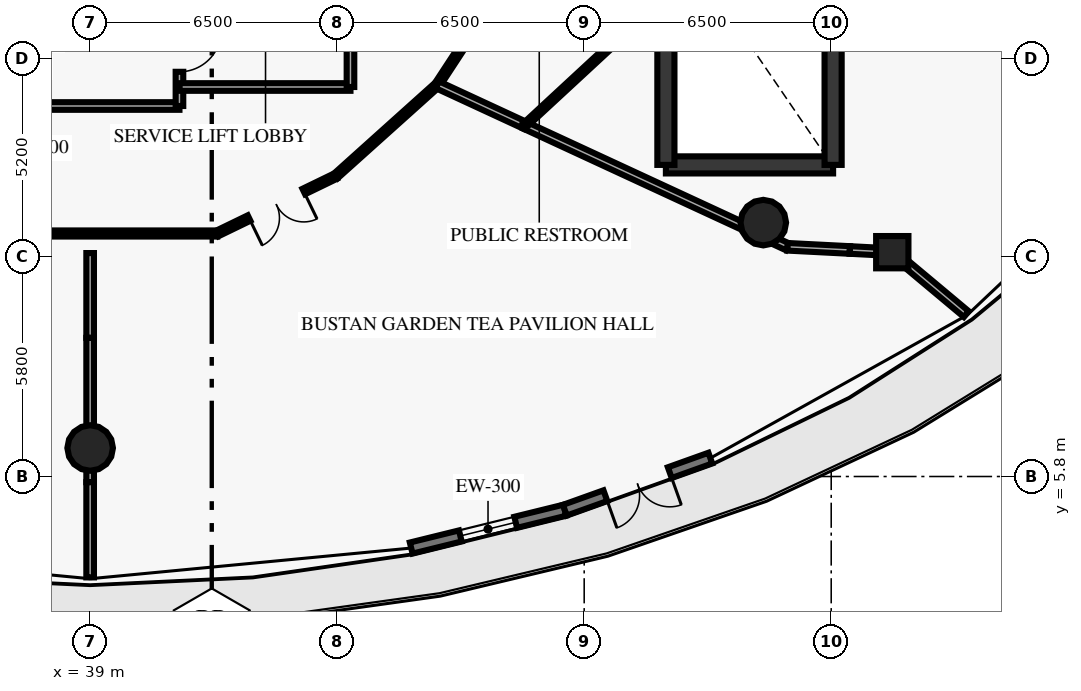
"""IFC4 building model, lengths in metres.
Left out: names, types, materials, properties, quantities, classifications, styles, units other than length and angle.
Written with IfcOpenShell. Run it as: python <this file> out.ifc"""

import sys

from ifc_helpers import new_model, si_unit, direction, frame, frame_2d, origin, origin_2d, place, context, subcontext, project, spatial, rectangle, circle, extrude, element, fill, save


model = new_model("IFC4")
c1 = context("Model", 3, precision=1e-05, world=origin(), true_north=direction((0.0, 1.0)))
c2 = subcontext(c1, "Body", "Model", "MODEL_VIEW")
j1 = project(units=[si_unit("LENGTHUNIT", "METRE"), si_unit("PLANEANGLEUNIT", "RADIAN")], contexts=[c1])
p1 = place(None, origin())
s1 = spatial("IfcSite", under=j1, at=p1, CompositionType="ELEMENT")
p2 = place(p1, origin())
s2 = spatial("IfcBuilding", under=s1, at=p2, CompositionType="ELEMENT")
p3 = place(p2, frame((0.0, 0.0, 16.0)))
s3 = spatial("IfcBuildingStorey", under=s2, at=p3, CompositionType="ELEMENT", Elevation=16.0)
for number, where, z_axis, x_axis in (
    (1, (39.0, 6.55, 0.0), (0.0, 0.0, 1.0), (1.0, 0.0, 0.0)),
    (2, (56.713, 12.481, 0.0), (0.0, 0.0, 1.0), (1.0, 0.0, 0.0)),
):
    element("IfcColumn", number, at=place(p3, frame(where, z_axis=z_axis, x_axis=x_axis)), inside=s3, PredefinedType="COLUMN", context=c2, shape_type="SweptSolid", body=[
        extrude(circle(Radius=0.6, at=origin_2d()), origin(), (0.0, 0.0, 1.0), 4.74),
    ])
p4 = place(p3, frame((60.107, 11.703, 0.0), z_axis=(0.0, 0.0, 1.0), x_axis=(1.0, 0.0, 0.0)))
e3 = element("IfcColumn", 3, at=p4, inside=s3, PredefinedType="COLUMN", context=c2, shape_type="SweptSolid", body=[
    extrude(rectangle(XDim=0.85, YDim=0.85, at=origin_2d()), origin(), (0.0, 0.0, 1.0), 4.74),
])
p5 = place(p3, frame((51.491, 4.913, 0.0), z_axis=(0.0, 0.0, 1.0), x_axis=(-0.970964611728, -0.239223165208, 0.0)))
e4 = element("IfcWall", 4, at=p5, inside=s3, PredefinedType="STANDARD", context=c2, shape_type="SweptSolid", body=[
    extrude(rectangle(XDim=4.164, YDim=0.3, at=frame_2d((2.082, 0.0))), origin(), (0.0, 0.0, 1.0), 4.74),
])
p6 = place(p5, frame((1.332, 0.0, 0.9)))
e5 = element("IfcOpeningElement", 5, at=p6, cuts=e4, PredefinedType="OPENING", context=c2, shape_type="SweptSolid", body=[
    extrude(rectangle(XDim=1.5, YDim=2.2, at=frame_2d((0.75, 1.1))), frame((0.0, 0.16, 0.0), z_axis=(0.0, -1.0, 0.0), x_axis=(1.0, 0.0, 0.0)), (0.0, 0.0, 1.0), 0.32),
])
p7 = place(p3, frame((55.32, 6.284, 0.0), z_axis=(0.0, 0.0, 1.0), x_axis=(-0.941483594304, -0.337058810381, 0.0)))
e6 = element("IfcWall", 6, at=p7, inside=s3, PredefinedType="STANDARD", context=c2, shape_type="SweptSolid", body=[
    extrude(rectangle(XDim=4.067, YDim=0.3, at=frame_2d((2.034, 0.0))), origin(), (0.0, 0.0, 1.0), 4.74),
])
p8 = place(p7, frame((1.134, 0.0, 0.0)))
e7 = element("IfcOpeningElement", 7, at=p8, cuts=e6, PredefinedType="OPENING", context=c2, shape_type="SweptSolid", body=[
    extrude(rectangle(XDim=1.8, YDim=2.25, at=frame_2d((0.9, 1.125))), frame((0.0, 0.16, 0.0), z_axis=(0.0, -1.0, 0.0), x_axis=(1.0, 0.0, 0.0)), (0.0, 0.0, 1.0), 0.32),
])
p9 = place(p3, frame((54.15, 14.0, 0.0), z_axis=(0.0, 0.0, 1.0), x_axis=(1.0, 0.0, 0.0)))
e8 = element("IfcWall", 8, at=p9, inside=s3, PredefinedType="SHEAR", context=c2, shape_type="SweptSolid", body=[
    extrude(rectangle(XDim=4.4, YDim=0.45, at=frame_2d((2.2, 0.0))), origin(), (0.0, 0.0, 1.0), 4.74),
])
for number, where, z_axis, x_axis in (
    (9, (54.15, 14.0, 0.0), (0.0, 0.0, 1.0), (0.0, 1.0, 0.0)),
    (10, (58.55, 14.0, 0.0), (0.0, 0.0, 1.0), (0.0, 1.0, 0.0)),
):
    element("IfcWall", number, at=place(p3, frame(where, z_axis=z_axis, x_axis=x_axis)), inside=s3, PredefinedType="SHEAR", context=c2, shape_type="SweptSolid", body=[
        extrude(rectangle(XDim=7.9, YDim=0.45, at=frame_2d((3.95, 0.0))), origin(), (0.0, 0.0, 1.0), 4.74),
    ])
p10 = place(p3, frame((33.8, 15.55, 0.0), z_axis=(0.0, 0.0, 1.0), x_axis=(1.0, 0.0, 0.0)))
e11 = element("IfcWall", 11, at=p10, inside=s3, PredefinedType="SOLIDWALL", context=c2, shape_type="SweptSolid", body=[
    extrude(rectangle(XDim=7.55, YDim=0.2, at=frame_2d((3.775, 0.0))), origin(), (0.0, 0.0, 1.0), 4.74),
])
p11 = place(p3, frame((41.35, 15.55, 0.0), z_axis=(0.0, 0.0, 1.0), x_axis=(0.0, 1.0, 0.0)))
e12 = element("IfcWall", 12, at=p11, inside=s3, PredefinedType="SOLIDWALL", context=c2, shape_type="SweptSolid", body=[
    extrude(rectangle(XDim=2.8, YDim=0.2, at=frame_2d((1.4, 0.0))), origin(), (0.0, 0.0, 1.0), 4.74),
])
p12 = place(p11, frame((0.9, 0.0, 0.0)))
e13 = element("IfcOpeningElement", 13, at=p12, cuts=e12, PredefinedType="OPENING", context=c2, shape_type="SweptSolid", body=[
    extrude(rectangle(XDim=1.1, YDim=2.15, at=frame_2d((0.55, 1.075))), frame((0.0, 0.11, 0.0), z_axis=(0.0, -1.0, 0.0), x_axis=(1.0, 0.0, 0.0)), (0.0, 0.0, 1.0), 0.22),
])
p13 = place(p3, frame((41.35, 16.05, 0.0), z_axis=(0.0, 0.0, 1.0), x_axis=(1.0, 0.0, 0.0)))
e14 = element("IfcWall", 14, at=p13, inside=s3, PredefinedType="SOLIDWALL", context=c2, shape_type="SweptSolid", body=[
    extrude(rectangle(XDim=4.5, YDim=0.2, at=frame_2d((2.25, 0.0))), origin(), (0.0, 0.0, 1.0), 4.74),
])
p14 = place(p3, frame((45.85, 16.05, 0.0), z_axis=(0.0, 0.0, 1.0), x_axis=(0.0, 1.0, 0.0)))
e15 = element("IfcWall", 15, at=p14, inside=s3, PredefinedType="SOLIDWALL", context=c2, shape_type="SweptSolid", body=[
    extrude(rectangle(XDim=2.3, YDim=0.2, at=frame_2d((1.15, 0.0))), origin(), (0.0, 0.0, 1.0), 4.74),
])
p15 = place(p3, frame((35.656, 12.195, 0.0), z_axis=(0.0, 0.0, 1.0), x_axis=(1.0, 0.0, 0.0)))
e16 = element("IfcWall", 16, at=p15, inside=s3, PredefinedType="PARTITIONING", context=c2, shape_type="SweptSolid", body=[
    extrude(rectangle(XDim=6.688, YDim=0.16, at=frame_2d((3.344, 0.0))), origin(), (0.0, 0.0, 1.0), 4.74),
])
p16 = place(p3, frame((45.46, 13.706, 0.0), z_axis=(0.0, 0.0, 1.0), x_axis=(-0.899789784655, -0.436323668199, 0.0)))
e17 = element("IfcWall", 17, at=p16, inside=s3, PredefinedType="PARTITIONING", context=c2, shape_type="SweptSolid", body=[
    extrude(rectangle(XDim=3.463, YDim=0.16, at=frame_2d((1.731, 0.0))), origin(), (0.0, 0.0, 1.0), 4.74),
])
p17 = place(p16, frame((0.932, 0.0, 0.0)))
e18 = element("IfcOpeningElement", 18, at=p17, cuts=e17, PredefinedType="OPENING", context=c2, shape_type="SweptSolid", body=[
    extrude(rectangle(XDim=1.6, YDim=2.2, at=frame_2d((0.8, 1.1))), frame((0.0, 0.09, 0.0), z_axis=(0.0, -1.0, 0.0), x_axis=(1.0, 0.0, 0.0)), (0.0, 0.0, 1.0), 0.18),
])
p18 = place(p3, frame((45.46, 13.706, 0.0), z_axis=(0.0, 0.0, 1.0), x_axis=(0.744066617248, 0.668105432621, 0.0)))
e19 = element("IfcWall", 19, at=p18, inside=s3, PredefinedType="PARTITIONING", context=c2, shape_type="SweptSolid", body=[
    extrude(rectangle(XDim=3.596, YDim=0.16, at=frame_2d((1.798, 0.0))), origin(), (0.0, 0.0, 1.0), 4.74),
])
p19 = place(p3, frame((50.189, 19.24, 0.0), z_axis=(0.0, 0.0, 1.0), x_axis=(-0.548318837904, -0.836269365694, 0.0)))
e20 = element("IfcWall", 20, at=p19, inside=s3, PredefinedType="PARTITIONING", context=c2, shape_type="SweptSolid", body=[
    extrude(rectangle(XDim=3.744, YDim=0.16, at=frame_2d((1.872, 0.0))), origin(), (0.0, 0.0, 1.0), 4.74),
])
p20 = place(p19, frame((1.447, 0.0, 0.0)))
e21 = element("IfcOpeningElement", 21, at=p20, cuts=e20, PredefinedType="OPENING", context=c2, shape_type="SweptSolid", body=[
    extrude(rectangle(XDim=0.85, YDim=2.1, at=frame_2d((0.425, 1.05))), frame((0.0, 0.09, 0.0), z_axis=(0.0, -1.0, 0.0), x_axis=(1.0, 0.0, 0.0)), (0.0, 0.0, 1.0), 0.18),
])
p21 = place(p3, frame((39.0, 11.68, 0.0), z_axis=(0.0, 0.0, 1.0), x_axis=(0.0, -1.0, 0.0)))
e22 = element("IfcWall", 22, at=p21, inside=s3, PredefinedType="PARTITIONING", context=c2, shape_type="SweptSolid", body=[
    extrude(rectangle(XDim=2.231, YDim=0.2, at=frame_2d((1.115, 0.0))), origin(), (0.0, 0.0, 1.0), 4.74),
])
p22 = place(p3, frame((39.0, 9.449, 0.0), z_axis=(0.0, 0.0, 1.0), x_axis=(0.0, -1.0, 0.0)))
e23 = element("IfcWall", 23, at=p22, inside=s3, PredefinedType="PARTITIONING", context=c2, shape_type="SweptSolid", body=[
    extrude(rectangle(XDim=2.913, YDim=0.2, at=frame_2d((1.457, 0.0))), origin(), (0.0, 0.0, 1.0), 2.74),
])
p23 = place(p3, frame((39.0, 6.536, 0.0), z_axis=(0.0, 0.0, 1.0), x_axis=(0.0, -1.0, 0.0)))
e24 = element("IfcWall", 24, at=p23, inside=s3, PredefinedType="PARTITIONING", context=c2, shape_type="SweptSolid", body=[
    extrude(rectangle(XDim=0.886, YDim=0.2, at=frame_2d((0.443, 0.0))), origin(), (0.0, 0.0, 1.0), 4.74),
])
p24 = place(p3, frame((39.0, 5.65, 0.0), z_axis=(0.0, 0.0, 1.0), x_axis=(0.0, -1.0, 0.0)))
e25 = element("IfcWall", 25, at=p24, inside=s3, PredefinedType="PARTITIONING", context=c2, shape_type="SweptSolid", body=[
    extrude(rectangle(XDim=2.505, YDim=0.2, at=frame_2d((1.252, 0.0))), origin(), (0.0, 0.0, 1.0), 4.74),
])
p25 = place(p3, frame((48.136, 16.109, 0.0), z_axis=(0.0, 0.0, 1.0), x_axis=(0.907508335547, -0.420034071133, 0.0)))
e26 = element("IfcWall", 26, at=p25, inside=s3, PredefinedType="PARTITIONING", context=c2, shape_type="SweptSolid", body=[
    extrude(rectangle(XDim=2.538, YDim=0.2, at=frame_2d((1.269, 0.0))), origin(), (0.0, 0.0, 1.0), 4.74),
])
p26 = place(p3, frame((50.439, 15.043, 0.0), z_axis=(0.0, 0.0, 1.0), x_axis=(0.907524397356, -0.419999366908, 0.0)))
e27 = element("IfcWall", 27, at=p26, inside=s3, PredefinedType="PARTITIONING", context=c2, shape_type="SweptSolid", body=[
    extrude(rectangle(XDim=7.614, YDim=0.2, at=frame_2d((3.807, 0.0))), origin(), (0.0, 0.0, 1.0), 4.74),
])
p27 = place(p3, frame((57.349, 11.845, 0.0), z_axis=(0.0, 0.0, 1.0), x_axis=(0.998692725363, -0.051115949639, 0.0)))
e28 = element("IfcWall", 28, at=p27, inside=s3, PredefinedType="PARTITIONING", context=c2, shape_type="SweptSolid", body=[
    extrude(rectangle(XDim=1.643, YDim=0.2, at=frame_2d((0.822, 0.0))), origin(), (0.0, 0.0, 1.0), 4.74),
])
p28 = place(p3, frame((58.99, 11.761, 0.0), z_axis=(0.0, 0.0, 1.0), x_axis=(0.998649603439, -0.051951607785, 0.0)))
e29 = element("IfcWall", 29, at=p28, inside=s3, PredefinedType="PARTITIONING", context=c2, shape_type="SweptSolid", body=[
    extrude(rectangle(XDim=1.118, YDim=0.2, at=frame_2d((0.559, 0.0))), origin(), (0.0, 0.0, 1.0), 4.28),
])
p29 = place(p3, frame((60.107, 11.703, 0.0), z_axis=(0.0, 0.0, 1.0), x_axis=(0.76695128647, -0.641705325038, 0.0)))
e30 = element("IfcWall", 30, at=p29, inside=s3, PredefinedType="PARTITIONING", context=c2, shape_type="SweptSolid", body=[
    extrude(rectangle(XDim=2.54, YDim=0.2, at=frame_2d((1.27, 0.0))), origin(), (0.0, 0.0, 1.0), 4.74),
])
p30 = place(p3, frame((50.439, 15.043, 0.0), z_axis=(0.0, 0.0, 1.0), x_axis=(0.734032370371, 0.679114481695, 0.0)))
e31 = element("IfcWall", 31, at=p30, inside=s3, PredefinedType="PARTITIONING", context=c2, shape_type="SweptSolid", body=[
    extrude(rectangle(XDim=3.765, YDim=0.14, at=frame_2d((1.883, 0.0))), origin(), (0.0, 0.0, 1.0), 4.74),
])
p31 = place(p6, origin())
e32 = element("IfcWindow", 32, at=p31, inside=s3, PartitioningType="DOUBLE_PANEL_VERTICAL", PredefinedType="WINDOW", context=c2, shape_type="SweptSolid", body=[
    extrude(rectangle(XDim=1.5, YDim=2.2, at=frame_2d((0.75, 1.1))), frame((0.0, 0.03, 0.0), z_axis=(0.0, -1.0, 0.0), x_axis=(1.0, 0.0, 0.0)), (0.0, 0.0, 1.0), 0.06),
])
fill(e5, e32)
p32 = place(p8, origin())
e33 = element("IfcDoor", 33, at=p32, inside=s3, OperationType="DOUBLE_DOOR_SINGLE_SWING", PredefinedType="DOOR", context=c2, shape_type="SweptSolid", body=[
    extrude(rectangle(XDim=1.8, YDim=2.25, at=frame_2d((0.9, 1.125))), frame((0.0, 0.025, 0.0), z_axis=(0.0, -1.0, 0.0), x_axis=(1.0, 0.0, 0.0)), (0.0, 0.0, 1.0), 0.05),
])
fill(e7, e33)
p33 = place(p12, origin())
e34 = element("IfcDoor", 34, at=p33, inside=s3, OperationType="SINGLE_SWING_RIGHT", PredefinedType="DOOR", context=c2, shape_type="SweptSolid", body=[
    extrude(rectangle(XDim=1.1, YDim=2.15, at=frame_2d((0.55, 1.075))), frame((0.0, 0.025, 0.0), z_axis=(0.0, -1.0, 0.0), x_axis=(1.0, 0.0, 0.0)), (0.0, 0.0, 1.0), 0.05),
])
fill(e13, e34)
p34 = place(p17, origin())
e35 = element("IfcDoor", 35, at=p34, inside=s3, OperationType="DOUBLE_DOOR_SINGLE_SWING", PredefinedType="DOOR", context=c2, shape_type="SweptSolid", body=[
    extrude(rectangle(XDim=1.6, YDim=2.2, at=frame_2d((0.8, 1.1))), frame((0.0, 0.025, 0.0), z_axis=(0.0, -1.0, 0.0), x_axis=(1.0, 0.0, 0.0)), (0.0, 0.0, 1.0), 0.05),
])
fill(e18, e35)
save(model, sys.argv[1])
